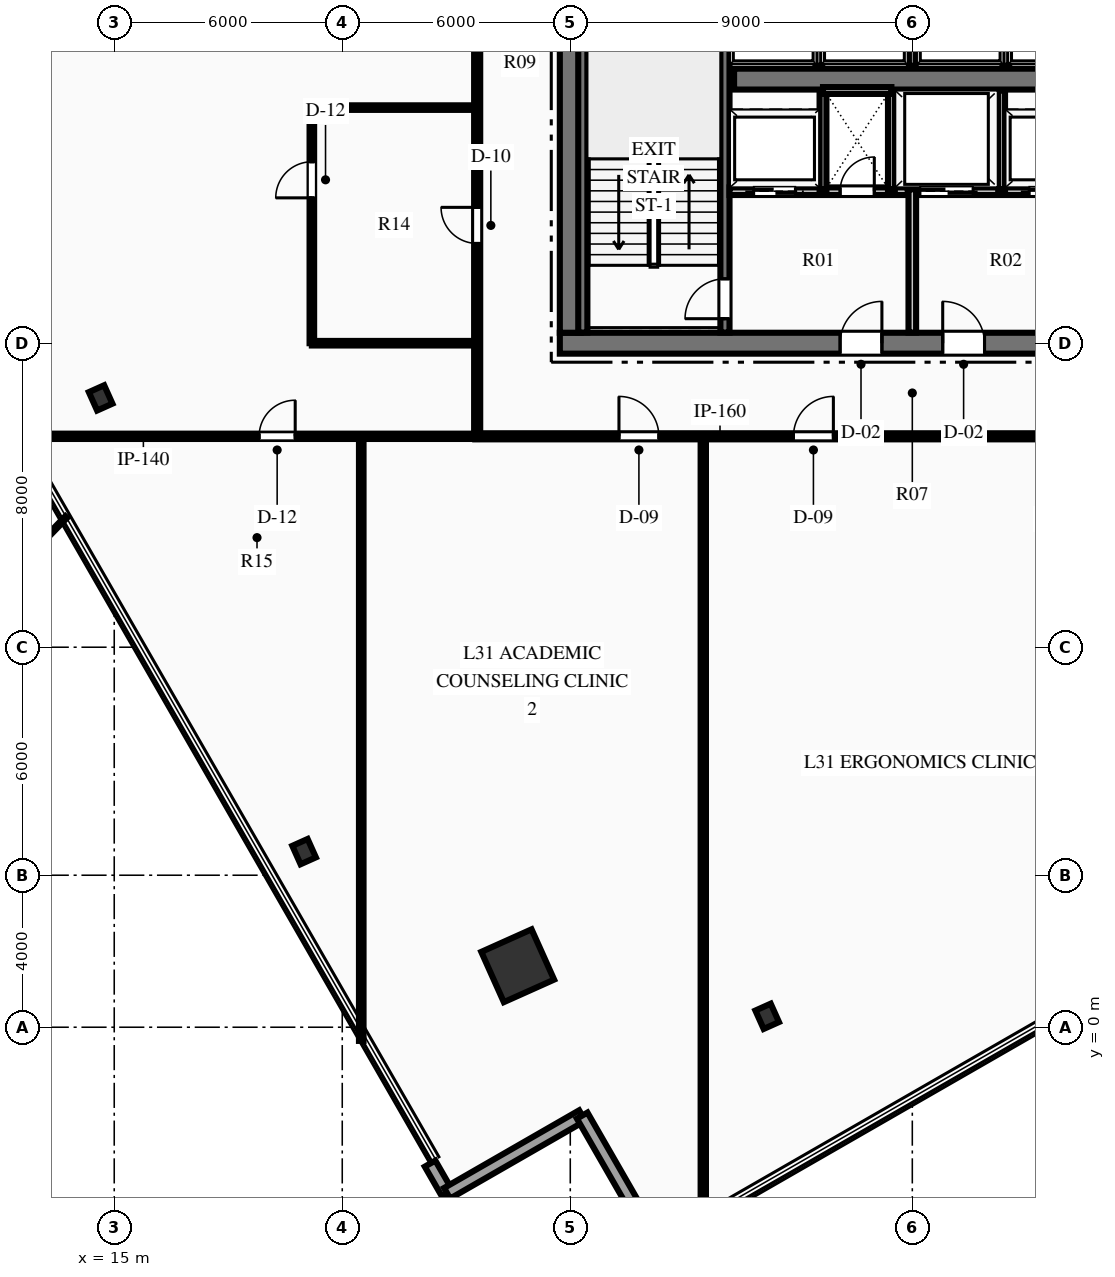
"""IFC4 building model, lengths in metres.
Left out: names, types, materials, properties, quantities, classifications, styles, units other than length and angle.
Written with IfcOpenShell. Run it as: python <this file> out.ifc"""

import sys

from ifc_helpers import new_model, si_unit, direction, frame, frame_2d, origin, origin_2d, place, context, subcontext, project, spatial, rectangle, hollow_rectangle, i_section, extrude, element, fill, save


model = new_model("IFC4")
c1 = context("Model", 3, precision=1e-05, world=origin(), true_north=direction((0.0, 1.0)))
c2 = subcontext(c1, "Body", "Model", "MODEL_VIEW")
j1 = project(units=[si_unit("LENGTHUNIT", "METRE"), si_unit("PLANEANGLEUNIT", "RADIAN")], contexts=[c1])
p1 = place(None, origin())
s1 = spatial("IfcSite", under=j1, at=p1, CompositionType="ELEMENT")
p2 = place(p1, origin())
s2 = spatial("IfcBuilding", under=s1, at=p2, CompositionType="ELEMENT")
p3 = place(p2, frame((0.0, 0.0, 127.95)))
s3 = spatial("IfcBuildingStorey", under=s2, at=p3, CompositionType="ELEMENT", Elevation=127.95)
p4 = place(p3, frame((26.725, 18.0, 0.0), z_axis=(0.0, 0.0, 1.0), x_axis=(1.0, 0.0, 0.0)))
e1 = element("IfcWall", 1, at=p4, inside=s3, PredefinedType="SHEAR", context=c2, shape_type="SweptSolid", body=[
    extrude(rectangle(XDim=18.55, YDim=0.55, at=frame_2d((9.275, 0.0))), origin(), (0.0, 0.0, 1.0), 3.75),
])
p5 = place(p4, frame((7.375, 0.0, 0.0)))
e2 = element("IfcOpeningElement", 2, at=p5, cuts=e1, PredefinedType="OPENING", context=c2, shape_type="SweptSolid", body=[
    extrude(rectangle(XDim=1.1, YDim=2.15, at=frame_2d((0.55, 1.075))), frame((0.0, 0.285, 0.0), z_axis=(0.0, -1.0, 0.0), x_axis=(1.0, 0.0, 0.0)), (0.0, 0.0, 1.0), 0.57),
])
p6 = place(p4, frame((10.075, 0.0, 0.0)))
e3 = element("IfcOpeningElement", 3, at=p6, cuts=e1, PredefinedType="OPENING", context=c2, shape_type="SweptSolid", body=[
    extrude(rectangle(XDim=1.1, YDim=2.15, at=frame_2d((0.55, 1.075))), frame((0.0, 0.285, 0.0), z_axis=(0.0, -1.0, 0.0), x_axis=(1.0, 0.0, 0.0)), (0.0, 0.0, 1.0), 0.57),
])
p7 = place(p3, frame((27.0, 18.275, 0.0), z_axis=(0.0, 0.0, 1.0), x_axis=(0.0, 1.0, 0.0)))
e4 = element("IfcWall", 4, at=p7, inside=s3, PredefinedType="SHEAR", context=c2, shape_type="SweptSolid", body=[
    extrude(rectangle(XDim=15.45, YDim=0.55, at=frame_2d((7.725, 0.0))), origin(), (0.0, 0.0, 1.0), 3.75),
])
p8 = place(p7, frame((9.965, 0.0, 0.0)))
e5 = element("IfcOpeningElement", 5, at=p8, cuts=e4, PredefinedType="OPENING", context=c2, shape_type="SweptSolid", body=[
    extrude(rectangle(XDim=1.4, YDim=2.2, at=frame_2d((0.7, 1.1))), frame((0.0, 0.285, 0.0), z_axis=(0.0, -1.0, 0.0), x_axis=(1.0, 0.0, 0.0)), (0.0, 0.0, 1.0), 0.57),
])
p9 = place(p3, frame((31.31, 24.95, 0.0), z_axis=(0.0, 0.0, 1.0), x_axis=(1.0, 0.0, 0.0)))
e6 = element("IfcWall", 6, at=p9, inside=s3, PredefinedType="SHEAR", context=c2, shape_type="SweptSolid", body=[
    extrude(rectangle(XDim=9.38, YDim=0.55, at=frame_2d((4.69, 0.0))), origin(), (0.0, 0.0, 1.0), 3.75),
])
p10 = place(p3, frame((31.07, 18.28, 0.0), z_axis=(0.0, 0.0, 1.0), x_axis=(0.0, 1.0, 0.0)))
e7 = element("IfcWall", 7, at=p10, inside=s3, PredefinedType="SHEAR", context=c2, shape_type="SweptSolid", body=[
    extrude(rectangle(XDim=8.26, YDim=0.24, at=frame_2d((4.13, 0.0))), origin(), (0.0, 0.0, 1.0), 3.75),
])
p11 = place(p10, frame((0.365, 0.0, 0.0)))
e8 = element("IfcOpeningElement", 8, at=p11, cuts=e7, PredefinedType="OPENING", context=c2, shape_type="SweptSolid", body=[
    extrude(rectangle(XDim=1.05, YDim=2.15, at=frame_2d((0.525, 1.075))), frame((0.0, 0.13, 0.0), z_axis=(0.0, -1.0, 0.0), x_axis=(1.0, 0.0, 0.0)), (0.0, 0.0, 1.0), 0.26),
])
p12 = place(p3, frame((27.33, 18.28, 0.0), z_axis=(0.0, 0.0, 1.0), x_axis=(0.0, 1.0, 0.0)))
e9 = element("IfcWall", 9, at=p12, inside=s3, PredefinedType="SHEAR", context=c2, shape_type="SweptSolid", body=[
    extrude(rectangle(XDim=8.26, YDim=0.24, at=frame_2d((4.13, 0.0))), origin(), (0.0, 0.0, 1.0), 3.75),
])
p13 = place(p3, frame((25.617, 1.618, 0.0), z_axis=(0.0, 0.0, 1.0), x_axis=(0.912477494148, 0.409126902895, 0.0)))
e10 = element("IfcColumn", 10, at=p13, inside=s3, PredefinedType="COLUMN", context=c2, shape_type="SweptSolid", body=[
    extrude(hollow_rectangle(XDim=1.45, YDim=1.45, WallThickness=0.07, at=origin_2d()), origin(), (0.0, 0.0, 1.0), 3.75),
])
for number, where, z_axis, x_axis in (
    (11, (32.181, 0.287, 0.0), (0.0, 0.0, 1.0), (0.912, 0.409, 0.0)),
    (12, (14.643, 16.561, 0.0), (0.0, 0.0, 1.0), (0.912, 0.409, 0.0)),
    (13, (19.996, 4.621, 0.0), (0.0, 0.0, 1.0), (0.912, 0.409, 0.0)),
):
    element("IfcColumn", number, at=place(p3, frame(where, z_axis=z_axis, x_axis=x_axis)), inside=s3, PredefinedType="COLUMN", context=c2, shape_type="SweptSolid", body=[
        extrude(i_section(OverallWidth=0.442, OverallDepth=0.531, WebThickness=0.066, FlangeThickness=0.106, at=origin_2d()), origin(), (0.0, 0.0, 1.0), 3.75),
    ])
p14 = place(p3, frame((23.759, -4.369, 0.0), z_axis=(0.0, 0.0, 1.0), x_axis=(-0.498445634445, 0.866920959201, 0.0)))
e14 = element("IfcWall", 14, at=p14, inside=s3, PredefinedType="STANDARD", context=c2, shape_type="SweptSolid", body=[
    extrude(rectangle(XDim=0.9, YDim=0.32, at=frame_2d((0.45, 0.0))), origin(), (0.0, 0.0, 1.0), 3.4),
])
p15 = place(p3, frame((27.314, -2.325, 0.0), z_axis=(0.0, 0.0, 1.0), x_axis=(-0.866917238564, -0.498452105503, 0.0)))
e15 = element("IfcWall", 15, at=p15, inside=s3, PredefinedType="STANDARD", context=c2, shape_type="SweptSolid", body=[
    extrude(rectangle(XDim=4.1, YDim=0.32, at=frame_2d((2.05, 0.0))), origin(), (0.0, 0.0, 1.0), 3.4),
])
p16 = place(p3, frame((29.357, -5.879, 0.0), z_axis=(0.0, 0.0, 1.0), x_axis=(-0.498477837049, 0.866902443168, 0.0)))
e16 = element("IfcWall", 16, at=p16, inside=s3, PredefinedType="STANDARD", context=c2, shape_type="SweptSolid", body=[
    extrude(rectangle(XDim=4.1, YDim=0.32, at=frame_2d((2.05, 0.0))), origin(), (0.0, 0.0, 1.0), 3.4),
])
p17 = place(p3, frame((36.0, 18.28, 0.0), z_axis=(0.0, 0.0, 1.0), x_axis=(0.0, 1.0, 0.0)))
e17 = element("IfcWall", 17, at=p17, inside=s3, PredefinedType="PARTITIONING", context=c2, shape_type="SweptSolid", body=[
    extrude(rectangle(XDim=3.77, YDim=0.2, at=frame_2d((1.885, 0.0))), origin(), (0.0, 0.0, 1.0), 3.4),
])
p18 = place(p3, frame((31.19, 22.0, 0.0), z_axis=(0.0, 0.0, 1.0), x_axis=(1.0, 0.0, 0.0)))
e18 = element("IfcWall", 18, at=p18, inside=s3, PredefinedType="PARTITIONING", context=c2, shape_type="SweptSolid", body=[
    extrude(rectangle(XDim=4.69, YDim=0.2, at=frame_2d((2.345, 0.0))), origin(), (0.0, 0.0, 1.0), 3.4),
])
p19 = place(p18, frame((2.91, 0.0, 0.0)))
e19 = element("IfcOpeningElement", 19, at=p19, cuts=e18, PredefinedType="OPENING", context=c2, shape_type="SweptSolid", body=[
    extrude(rectangle(XDim=0.9, YDim=2.15, at=frame_2d((0.45, 1.075))), frame((0.0, 0.11, 0.0), z_axis=(0.0, -1.0, 0.0), x_axis=(1.0, 0.0, 0.0)), (0.0, 0.0, 1.0), 0.22),
])
p20 = place(p18, frame((0.635, 0.0, 0.0)))
e20 = element("IfcOpeningElement", 20, at=p20, cuts=e18, PredefinedType="OPENING", context=c2, shape_type="SweptSolid", body=[
    extrude(rectangle(XDim=1.1, YDim=2.15, at=frame_2d((0.55, 1.075))), frame((0.0, 0.11, 0.0), z_axis=(0.0, -1.0, 0.0), x_axis=(1.0, 0.0, 0.0)), (0.0, 0.0, 1.0), 0.22),
])
p21 = place(p3, frame((36.12, 22.0, 0.0), z_axis=(0.0, 0.0, 1.0), x_axis=(1.0, 0.0, 0.0)))
e21 = element("IfcWall", 21, at=p21, inside=s3, PredefinedType="PARTITIONING", context=c2, shape_type="SweptSolid", body=[
    extrude(rectangle(XDim=4.69, YDim=0.2, at=frame_2d((2.345, 0.0))), origin(), (0.0, 0.0, 1.0), 3.4),
])
p22 = place(p21, frame((2.955, 0.0, 0.0)))
e22 = element("IfcOpeningElement", 22, at=p22, cuts=e21, PredefinedType="OPENING", context=c2, shape_type="SweptSolid", body=[
    extrude(rectangle(XDim=1.1, YDim=2.15, at=frame_2d((0.55, 1.075))), frame((0.0, 0.11, 0.0), z_axis=(0.0, -1.0, 0.0), x_axis=(1.0, 0.0, 0.0)), (0.0, 0.0, 1.0), 0.22),
])
p23 = place(p21, frame((0.08, 0.0, 0.0)))
e23 = element("IfcOpeningElement", 23, at=p23, cuts=e21, PredefinedType="OPENING", context=c2, shape_type="SweptSolid", body=[
    extrude(rectangle(XDim=1.4, YDim=2.2, at=frame_2d((0.7, 1.1))), frame((0.0, 0.11, 0.0), z_axis=(0.0, -1.0, 0.0), x_axis=(1.0, 0.0, 0.0)), (0.0, 0.0, 1.0), 0.22),
])
for number, where, z_axis, x_axis in (
    (24, (33.65, 22.05, 0.0), (0.0, 0.0, 1.0), (0.0, 1.0, 0.0)),
    (25, (35.45, 22.05, 0.0), (0.0, 0.0, 1.0), (0.0, 1.0, 0.0)),
):
    element("IfcWall", number, at=place(p3, frame(where, z_axis=z_axis, x_axis=x_axis)), inside=s3, PredefinedType="PARTITIONING", context=c2, shape_type="SweptSolid", body=[
        extrude(rectangle(XDim=2.6, YDim=0.18, at=frame_2d((1.3, 0.0))), origin(), (0.0, 0.0, 1.0), 3.4),
    ])
p24 = place(p3, frame((33.65, 24.65, 0.0), z_axis=(0.0, 0.0, 1.0), x_axis=(1.0, 0.0, 0.0)))
e26 = element("IfcWall", 26, at=p24, inside=s3, PredefinedType="PARTITIONING", context=c2, shape_type="SweptSolid", body=[
    extrude(rectangle(XDim=1.8, YDim=0.18, at=frame_2d((0.9, 0.0))), origin(), (0.0, 0.0, 1.0), 3.4),
])
p25 = place(p3, frame((38.35, 22.05, 0.0), z_axis=(0.0, 0.0, 1.0), x_axis=(0.0, 1.0, 0.0)))
e27 = element("IfcWall", 27, at=p25, inside=s3, PredefinedType="PARTITIONING", context=c2, shape_type="SweptSolid", body=[
    extrude(rectangle(XDim=2.6, YDim=0.18, at=frame_2d((1.3, 0.0))), origin(), (0.0, 0.0, 1.0), 3.4),
])
for number, where, z_axis, x_axis in (
    (28, (33.54, 25.3, 0.0), (0.0, 0.0, 1.0), (0.0, 1.0, 0.0)),
    (29, (36.0, 25.3, 0.0), (0.0, 0.0, 1.0), (0.0, 1.0, 0.0)),
    (30, (38.46, 25.3, 0.0), (0.0, 0.0, 1.0), (0.0, 1.0, 0.0)),
):
    element("IfcWall", number, at=place(p3, frame(where, z_axis=z_axis, x_axis=x_axis)), inside=s3, PredefinedType="PARTITIONING", context=c2, shape_type="SweptSolid", body=[
        extrude(rectangle(XDim=1.9, YDim=0.18, at=frame_2d((0.95, 0.0))), origin(), (0.0, 0.0, 1.0), 3.4),
    ])
p26 = place(p3, frame((24.5, 15.55, 0.0), z_axis=(0.0, 0.0, 1.0), x_axis=(1.0, 0.0, 0.0)))
e31 = element("IfcWall", 31, at=p26, inside=s3, PredefinedType="PARTITIONING", context=c2, shape_type="SweptSolid", body=[
    extrude(rectangle(XDim=23.0, YDim=0.16, at=frame_2d((11.5, 0.0))), origin(), (0.0, 0.0, 1.0), 3.4),
])
p27 = place(p26, frame((16.15, 0.0, 0.0)))
e32 = element("IfcOpeningElement", 32, at=p27, cuts=e31, PredefinedType="OPENING", context=c2, shape_type="SweptSolid", body=[
    extrude(rectangle(XDim=0.9, YDim=2.15, at=frame_2d((0.45, 1.075))), frame((0.0, 0.09, 0.0), z_axis=(0.0, -1.0, 0.0), x_axis=(1.0, 0.0, 0.0)), (0.0, 0.0, 1.0), 0.18),
])
p28 = place(p26, frame((18.45, 0.0, 0.0)))
e33 = element("IfcOpeningElement", 33, at=p28, cuts=e31, PredefinedType="OPENING", context=c2, shape_type="SweptSolid", body=[
    extrude(rectangle(XDim=0.9, YDim=2.15, at=frame_2d((0.45, 1.075))), frame((0.0, 0.09, 0.0), z_axis=(0.0, -1.0, 0.0), x_axis=(1.0, 0.0, 0.0)), (0.0, 0.0, 1.0), 0.18),
])
p29 = place(p26, frame((20.7, 0.0, 0.0)))
e34 = element("IfcOpeningElement", 34, at=p29, cuts=e31, PredefinedType="OPENING", context=c2, shape_type="SweptSolid", body=[
    extrude(rectangle(XDim=1.0, YDim=2.15, at=frame_2d((0.5, 1.075))), frame((0.0, 0.09, 0.0), z_axis=(0.0, -1.0, 0.0), x_axis=(1.0, 0.0, 0.0)), (0.0, 0.0, 1.0), 0.18),
])
p30 = place(p26, frame((3.781, 0.0, 0.0)))
e35 = element("IfcOpeningElement", 35, at=p30, cuts=e31, PredefinedType="OPENING", context=c2, shape_type="SweptSolid", body=[
    extrude(rectangle(XDim=1.05, YDim=2.15, at=frame_2d((0.525, 1.075))), frame((0.0, 0.09, 0.0), z_axis=(0.0, -1.0, 0.0), x_axis=(1.0, 0.0, 0.0)), (0.0, 0.0, 1.0), 0.18),
])
p31 = place(p26, frame((8.373, 0.0, 0.0)))
e36 = element("IfcOpeningElement", 36, at=p31, cuts=e31, PredefinedType="OPENING", context=c2, shape_type="SweptSolid", body=[
    extrude(rectangle(XDim=1.05, YDim=2.15, at=frame_2d((0.525, 1.075))), frame((0.0, 0.09, 0.0), z_axis=(0.0, -1.0, 0.0), x_axis=(1.0, 0.0, 0.0)), (0.0, 0.0, 1.0), 0.18),
])
p32 = place(p3, frame((24.55, 15.55, 0.0), z_axis=(0.0, 0.0, 1.0), x_axis=(0.0, 1.0, 0.0)))
e37 = element("IfcWall", 37, at=p32, inside=s3, PredefinedType="PARTITIONING", context=c2, shape_type="SweptSolid", body=[
    extrude(rectangle(XDim=20.9, YDim=0.16, at=frame_2d((10.45, 0.0))), origin(), (0.0, 0.0, 1.0), 3.4),
])
p33 = place(p32, frame((5.075, 0.0, 0.0)))
e38 = element("IfcOpeningElement", 38, at=p33, cuts=e37, PredefinedType="OPENING", context=c2, shape_type="SweptSolid", body=[
    extrude(rectangle(XDim=0.95, YDim=2.15, at=frame_2d((0.475, 1.075))), frame((0.0, 0.09, 0.0), z_axis=(0.0, -1.0, 0.0), x_axis=(1.0, 0.0, 0.0)), (0.0, 0.0, 1.0), 0.18),
])
p34 = place(p32, frame((12.524, 0.0, 0.0)))
e39 = element("IfcOpeningElement", 39, at=p34, cuts=e37, PredefinedType="OPENING", context=c2, shape_type="SweptSolid", body=[
    extrude(rectangle(XDim=1.05, YDim=2.15, at=frame_2d((0.525, 1.075))), frame((0.0, 0.09, 0.0), z_axis=(0.0, -1.0, 0.0), x_axis=(1.0, 0.0, 0.0)), (0.0, 0.0, 1.0), 0.18),
])
p35 = place(p3, frame((12.352, 15.55, 0.0), z_axis=(0.0, 0.0, 1.0), x_axis=(1.0, 0.0, 0.0)))
e40 = element("IfcWall", 40, at=p35, inside=s3, PredefinedType="PARTITIONING", context=c2, shape_type="SweptSolid", body=[
    extrude(rectangle(XDim=12.198, YDim=0.14, at=frame_2d((6.099, 0.0))), origin(), (0.0, 0.0, 1.0), 3.4),
])
p36 = place(p35, frame((6.46, 0.0, 0.0)))
e41 = element("IfcOpeningElement", 41, at=p36, cuts=e40, PredefinedType="OPENING", context=c2, shape_type="SweptSolid", body=[
    extrude(rectangle(XDim=0.95, YDim=2.15, at=frame_2d((0.475, 1.075))), frame((0.0, 0.08, 0.0), z_axis=(0.0, -1.0, 0.0), x_axis=(1.0, 0.0, 0.0)), (0.0, 0.0, 1.0), 0.16),
])
p37 = place(p3, frame((21.5, -0.36, 0.0), z_axis=(0.0, 0.0, 1.0), x_axis=(0.0, 1.0, 0.0)))
e42 = element("IfcWall", 42, at=p37, inside=s3, PredefinedType="PARTITIONING", context=c2, shape_type="SweptSolid", body=[
    extrude(rectangle(XDim=15.91, YDim=0.12, at=frame_2d((7.955, 0.0))), origin(), (0.0, 0.0, 1.0), 3.4),
])
p38 = place(p3, frame((30.5, -5.176, 0.0), z_axis=(0.0, 0.0, 1.0), x_axis=(0.0, 1.0, 0.0)))
e43 = element("IfcWall", 43, at=p38, inside=s3, PredefinedType="PARTITIONING", context=c2, shape_type="SweptSolid", body=[
    extrude(rectangle(XDim=20.726, YDim=0.14, at=frame_2d((10.363, 0.0))), origin(), (0.0, 0.0, 1.0), 3.4),
])
p39 = place(p3, frame((20.2, 18.0, 0.0), z_axis=(0.0, 0.0, 1.0), x_axis=(1.0, 0.0, 0.0)))
e44 = element("IfcWall", 44, at=p39, inside=s3, PredefinedType="PARTITIONING", context=c2, shape_type="SweptSolid", body=[
    extrude(rectangle(XDim=4.35, YDim=0.12, at=frame_2d((2.175, 0.0))), origin(), (0.0, 0.0, 1.0), 2.699),
])
p40 = place(p3, frame((20.2, 18.0, 0.0), z_axis=(0.0, 0.0, 1.0), x_axis=(0.0, 1.0, 0.0)))
e45 = element("IfcWall", 45, at=p40, inside=s3, PredefinedType="PARTITIONING", context=c2, shape_type="SweptSolid", body=[
    extrude(rectangle(XDim=6.2, YDim=0.12, at=frame_2d((3.1, 0.0))), origin(), (0.0, 0.0, 1.0), 3.4),
])
p41 = place(p40, frame((3.825, 0.0, 0.0)))
e46 = element("IfcOpeningElement", 46, at=p41, cuts=e45, PredefinedType="OPENING", context=c2, shape_type="SweptSolid", body=[
    extrude(rectangle(XDim=0.95, YDim=2.15, at=frame_2d((0.475, 1.075))), frame((0.0, 0.07, 0.0), z_axis=(0.0, -1.0, 0.0), x_axis=(1.0, 0.0, 0.0)), (0.0, 0.0, 1.0), 0.14),
])
p42 = place(p3, frame((20.2, 24.2, 0.0), z_axis=(0.0, 0.0, 1.0), x_axis=(1.0, 0.0, 0.0)))
e47 = element("IfcWall", 47, at=p42, inside=s3, PredefinedType="PARTITIONING", context=c2, shape_type="SweptSolid", body=[
    extrude(rectangle(XDim=4.35, YDim=0.12, at=frame_2d((2.175, 0.0))), origin(), (0.0, 0.0, 1.0), 3.4),
])
p43 = place(p11, origin())
e48 = element("IfcDoor", 48, at=p43, inside=s3, OperationType="SINGLE_SWING_LEFT", PredefinedType="DOOR", context=c2, shape_type="SweptSolid", body=[
    extrude(rectangle(XDim=1.05, YDim=2.15, at=frame_2d((0.525, 1.075))), frame((0.0, 0.025, 0.0), z_axis=(0.0, -1.0, 0.0), x_axis=(1.0, 0.0, 0.0)), (0.0, 0.0, 1.0), 0.05),
])
fill(e8, e48)
p44 = place(p5, origin())
e49 = element("IfcDoor", 49, at=p44, inside=s3, OperationType="SINGLE_SWING_RIGHT", PredefinedType="DOOR", context=c2, shape_type="SweptSolid", body=[
    extrude(rectangle(XDim=1.1, YDim=2.15, at=frame_2d((0.55, 1.075))), frame((0.0, 0.025, 0.0), z_axis=(0.0, -1.0, 0.0), x_axis=(1.0, 0.0, 0.0)), (0.0, 0.0, 1.0), 0.05),
])
fill(e2, e49)
p45 = place(p6, origin())
e50 = element("IfcDoor", 50, at=p45, inside=s3, OperationType="SINGLE_SWING_LEFT", PredefinedType="DOOR", context=c2, shape_type="SweptSolid", body=[
    extrude(rectangle(XDim=1.1, YDim=2.15, at=frame_2d((0.55, 1.075))), frame((0.0, 0.025, 0.0), z_axis=(0.0, -1.0, 0.0), x_axis=(1.0, 0.0, 0.0)), (0.0, 0.0, 1.0), 0.05),
])
fill(e3, e50)
p46 = place(p19, origin())
e51 = element("IfcDoor", 51, at=p46, inside=s3, OperationType="SINGLE_SWING_RIGHT", PredefinedType="DOOR", context=c2, shape_type="SweptSolid", body=[
    extrude(rectangle(XDim=0.9, YDim=2.15, at=frame_2d((0.45, 1.075))), frame((0.0, 0.025, 0.0), z_axis=(0.0, -1.0, 0.0), x_axis=(1.0, 0.0, 0.0)), (0.0, 0.0, 1.0), 0.05),
])
fill(e19, e51)
p47 = place(p33, origin())
e52 = element("IfcDoor", 52, at=p47, inside=s3, OperationType="SINGLE_SWING_RIGHT", PredefinedType="DOOR", context=c2, shape_type="SweptSolid", body=[
    extrude(rectangle(XDim=0.95, YDim=2.15, at=frame_2d((0.475, 1.075))), frame((0.0, 0.025, 0.0), z_axis=(0.0, -1.0, 0.0), x_axis=(1.0, 0.0, 0.0)), (0.0, 0.0, 1.0), 0.05),
])
fill(e38, e52)
p48 = place(p41, origin())
e53 = element("IfcDoor", 53, at=p48, inside=s3, OperationType="SINGLE_SWING_LEFT", PredefinedType="DOOR", context=c2, shape_type="SweptSolid", body=[
    extrude(rectangle(XDim=0.95, YDim=2.15, at=frame_2d((0.475, 1.075))), frame((0.0, 0.025, 0.0), z_axis=(0.0, -1.0, 0.0), x_axis=(1.0, 0.0, 0.0)), (0.0, 0.0, 1.0), 0.05),
])
fill(e46, e53)
p49 = place(p36, origin())
e54 = element("IfcDoor", 54, at=p49, inside=s3, OperationType="SINGLE_SWING_RIGHT", PredefinedType="DOOR", context=c2, shape_type="SweptSolid", body=[
    extrude(rectangle(XDim=0.95, YDim=2.15, at=frame_2d((0.475, 1.075))), frame((0.0, 0.025, 0.0), z_axis=(0.0, -1.0, 0.0), x_axis=(1.0, 0.0, 0.0)), (0.0, 0.0, 1.0), 0.05),
])
fill(e41, e54)
p50 = place(p30, origin())
e55 = element("IfcDoor", 55, at=p50, inside=s3, OperationType="SINGLE_SWING_LEFT", PredefinedType="DOOR", context=c2, shape_type="SweptSolid", body=[
    extrude(rectangle(XDim=1.05, YDim=2.15, at=frame_2d((0.525, 1.075))), frame((0.0, 0.025, 0.0), z_axis=(0.0, -1.0, 0.0), x_axis=(1.0, 0.0, 0.0)), (0.0, 0.0, 1.0), 0.05),
])
fill(e35, e55)
p51 = place(p31, origin())
e56 = element("IfcDoor", 56, at=p51, inside=s3, OperationType="SINGLE_SWING_RIGHT", PredefinedType="DOOR", context=c2, shape_type="SweptSolid", body=[
    extrude(rectangle(XDim=1.05, YDim=2.15, at=frame_2d((0.525, 1.075))), frame((0.0, 0.025, 0.0), z_axis=(0.0, -1.0, 0.0), x_axis=(1.0, 0.0, 0.0)), (0.0, 0.0, 1.0), 0.05),
])
fill(e36, e56)
p52 = place(p20, origin())
e57 = element("IfcDoor", 57, at=p52, inside=s3, OperationType="SLIDING_TO_LEFT", PredefinedType="DOOR", context=c2, shape_type="SweptSolid", body=[
    extrude(rectangle(XDim=1.1, YDim=2.15, at=frame_2d((0.55, 1.075))), frame((0.0, 0.025, 0.0), z_axis=(0.0, -1.0, 0.0), x_axis=(1.0, 0.0, 0.0)), (0.0, 0.0, 1.0), 0.05),
])
fill(e20, e57)
p53 = place(p22, origin())
e58 = element("IfcDoor", 58, at=p53, inside=s3, OperationType="SLIDING_TO_LEFT", PredefinedType="DOOR", context=c2, shape_type="SweptSolid", body=[
    extrude(rectangle(XDim=1.1, YDim=2.15, at=frame_2d((0.55, 1.075))), frame((0.0, 0.025, 0.0), z_axis=(0.0, -1.0, 0.0), x_axis=(1.0, 0.0, 0.0)), (0.0, 0.0, 1.0), 0.05),
])
fill(e22, e58)
p54 = place(p23, origin())
e59 = element("IfcDoor", 59, at=p54, inside=s3, OperationType="SLIDING_TO_LEFT", PredefinedType="DOOR", context=c2, shape_type="SweptSolid", body=[
    extrude(rectangle(XDim=1.4, YDim=2.2, at=frame_2d((0.7, 1.1))), frame((0.0, 0.025, 0.0), z_axis=(0.0, -1.0, 0.0), x_axis=(1.0, 0.0, 0.0)), (0.0, 0.0, 1.0), 0.05),
])
fill(e23, e59)
save(model, sys.argv[1])
